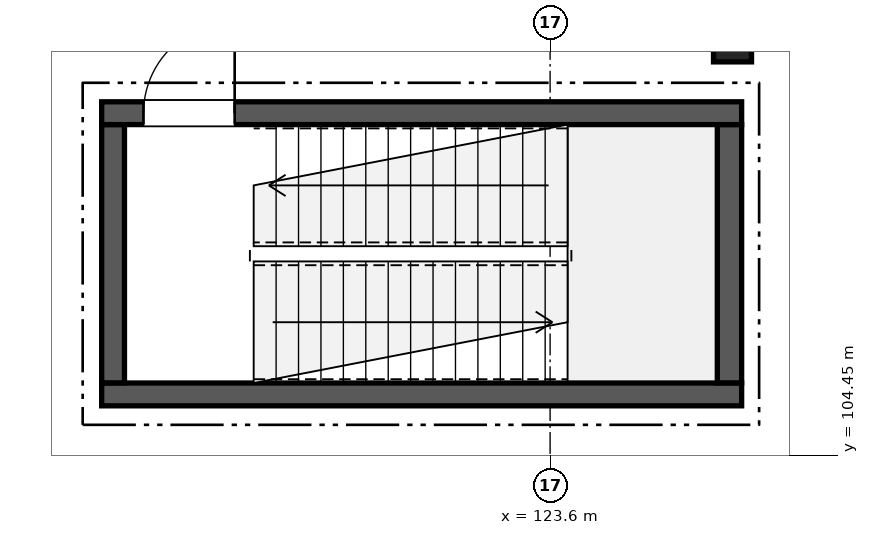
"""IFC4 building model, lengths in metres.
Left out: names, types, materials, properties, quantities, classifications, styles, units other than length and angle.
Written with IfcOpenShell. Run it as: python <this file> out.ifc"""

import sys

from ifc_helpers import new_model, si_unit, direction, frame, frame_2d, origin, origin_2d, place, context, subcontext, project, spatial, rectangle, extrude, element, fill, save


model = new_model("IFC4")
c1 = context("Model", 3, precision=1e-05, world=origin(), true_north=direction((0.0, 1.0)))
c2 = subcontext(c1, "Body", "Model", "MODEL_VIEW")
j1 = project(units=[si_unit("LENGTHUNIT", "METRE"), si_unit("PLANEANGLEUNIT", "RADIAN")], contexts=[c1])
p1 = place(None, origin())
s1 = spatial("IfcSite", under=j1, at=p1, CompositionType="ELEMENT")
p2 = place(p1, origin())
s2 = spatial("IfcBuilding", under=s1, at=p2, CompositionType="ELEMENT")
p3 = place(p2, origin())
s3 = spatial("IfcBuildingStorey", under=s2, at=p3, CompositionType="ELEMENT", Elevation=0.0)
p4 = place(p3, frame((126.0, 110.0, 0.0), z_axis=(0.0, 0.0, 1.0), x_axis=(1.0, 0.0, 0.0)))
e1 = element("IfcColumn", 1, at=p4, inside=s3, PredefinedType="COLUMN", context=c2, shape_type="SweptSolid", body=[
    extrude(rectangle(XDim=0.5, YDim=0.75, at=origin_2d()), origin(), (0.0, 0.0, 1.0), 5.1),
])
p5 = place(p3, frame((117.7, 105.25, 0.0), z_axis=(0.0, 0.0, 1.0), x_axis=(1.0, 0.0, 0.0)))
e2 = element("IfcWall", 2, at=p5, inside=s3, PredefinedType="SHEAR", context=c2, shape_type="SweptSolid", body=[
    extrude(rectangle(XDim=8.42, YDim=0.3, at=frame_2d((4.21, 0.0))), origin(), (0.0, 0.0, 1.0), 4.81),
])
p6 = place(p3, frame((117.7, 108.95, 0.0), z_axis=(0.0, 0.0, 1.0), x_axis=(1.0, 0.0, 0.0)))
e3 = element("IfcWall", 3, at=p6, inside=s3, PredefinedType="SHEAR", context=c2, shape_type="SweptSolid", body=[
    extrude(rectangle(XDim=8.42, YDim=0.3, at=frame_2d((4.21, 0.0))), origin(), (0.0, 0.0, 1.0), 4.81),
])
p7 = place(p6, frame((0.55, 0.0, 0.0)))
e4 = element("IfcOpeningElement", 4, at=p7, cuts=e3, PredefinedType="OPENING", context=c2, shape_type="SweptSolid", body=[
    extrude(rectangle(XDim=1.2, YDim=2.2, at=frame_2d((0.6, 1.1))), frame((0.0, 0.16, 0.0), z_axis=(0.0, -1.0, 0.0), x_axis=(1.0, 0.0, 0.0)), (0.0, 0.0, 1.0), 0.32),
])
p8 = place(p3, frame((117.85, 105.402, 0.0), z_axis=(0.0, 0.0, 1.0), x_axis=(0.0, 1.0, 0.0)))
e5 = element("IfcWall", 5, at=p8, inside=s3, PredefinedType="SHEAR", context=c2, shape_type="SweptSolid", body=[
    extrude(rectangle(XDim=3.396, YDim=0.3, at=frame_2d((1.698, 0.0))), origin(), (0.0, 0.0, 1.0), 4.81),
])
p9 = place(p3, frame((125.96, 105.402, 0.0), z_axis=(0.0, 0.0, 1.0), x_axis=(0.0, 1.0, 0.0)))
e6 = element("IfcWall", 6, at=p9, inside=s3, PredefinedType="SHEAR", context=c2, shape_type="SweptSolid", body=[
    extrude(rectangle(XDim=3.396, YDim=0.32, at=frame_2d((1.698, 0.0))), origin(), (0.0, 0.0, 1.0), 4.81),
])
p10 = place(p7, origin())
e7 = element("IfcDoor", 7, at=p10, inside=s3, OperationType="SINGLE_SWING_RIGHT", PredefinedType="DOOR", context=c2, shape_type="SweptSolid", body=[
    extrude(rectangle(XDim=1.2, YDim=2.2, at=frame_2d((0.6, 1.1))), frame((0.0, 0.025, 0.0), z_axis=(0.0, -1.0, 0.0), x_axis=(1.0, 0.0, 0.0)), (0.0, 0.0, 1.0), 0.05),
])
fill(e4, e7)
save(model, sys.argv[1])
